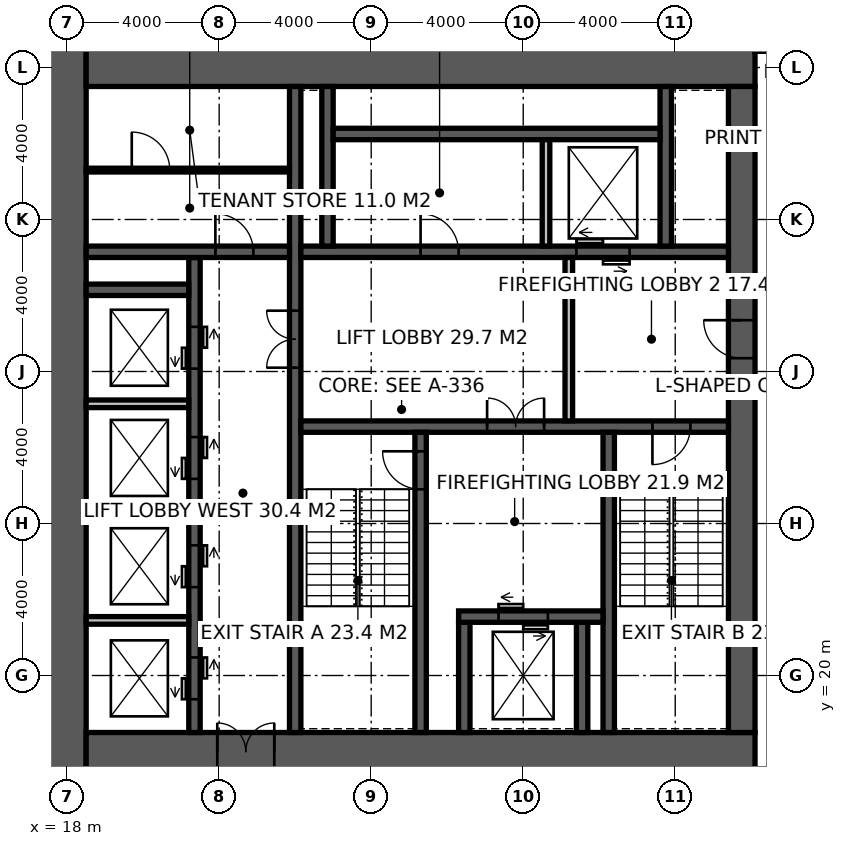
"""IFC4 building model, lengths in metres.
Left out: names, types, materials, properties, quantities, classifications, styles, units other than length and angle.
Written with IfcOpenShell. Run it as: python <this file> out.ifc"""

import sys

from ifc_helpers import new_model, si_unit, direction, frame, frame_2d, origin, place, context, subcontext, project, spatial, rectangle, extrude, element, fill, save


model = new_model("IFC4")
c1 = context("Model", 3, precision=1e-05, world=origin(), true_north=direction((0.0, 1.0)))
c2 = subcontext(c1, "Body", "Model", "MODEL_VIEW")
j1 = project(units=[si_unit("LENGTHUNIT", "METRE"), si_unit("PLANEANGLEUNIT", "RADIAN")], contexts=[c1])
p1 = place(None, origin())
s1 = spatial("IfcSite", under=j1, at=p1, CompositionType="ELEMENT")
p2 = place(p1, origin())
s2 = spatial("IfcBuilding", under=s1, at=p2, CompositionType="ELEMENT")
p3 = place(p2, frame((0.0, 0.0, 214.2)))
s3 = spatial("IfcBuildingStorey", under=s2, at=p3, CompositionType="ELEMENT", Elevation=214.2)
p4 = place(p3, frame((18.0, 17.5, -0.15), z_axis=(0.0, 0.0, 1.0), x_axis=(0.0, 1.0, 0.0)))
e1 = element("IfcWall", 1, at=p4, inside=s3, PredefinedType="SHEAR", context=c2, shape_type="SweptSolid", body=[
    extrude(rectangle(XDim=19.0, YDim=1.0, at=frame_2d((9.5, 0.0))), origin(), (0.0, 0.0, 1.0), 4.0),
])
p5 = place(p3, frame((18.5, 18.0, -0.15), z_axis=(0.0, 0.0, 1.0), x_axis=(1.0, 0.0, 0.0)))
e2 = element("IfcWall", 2, at=p5, inside=s3, PredefinedType="SHEAR", context=c2, shape_type="SweptSolid", body=[
    extrude(rectangle(XDim=17.6, YDim=1.0, at=frame_2d((8.8, 0.0))), origin(), (0.0, 0.0, 1.0), 4.0),
])
p6 = place(p5, frame((3.45, 0.0, 0.15)))
e3 = element("IfcOpeningElement", 3, at=p6, cuts=e2, PredefinedType="OPENING", context=c2, shape_type="SweptSolid", body=[
    extrude(rectangle(XDim=1.5, YDim=2.4, at=frame_2d((0.75, 1.2))), frame((0.0, 0.51, 0.0), z_axis=(0.0, -1.0, 0.0), x_axis=(1.0, 0.0, 0.0)), (0.0, 0.0, 1.0), 1.02),
])
p7 = place(p3, frame((18.5, 36.0, -0.15), z_axis=(0.0, 0.0, 1.0), x_axis=(1.0, 0.0, 0.0)))
e4 = element("IfcWall", 4, at=p7, inside=s3, PredefinedType="SHEAR", context=c2, shape_type="SweptSolid", body=[
    extrude(rectangle(XDim=17.6, YDim=1.0, at=frame_2d((8.8, 0.0))), origin(), (0.0, 0.0, 1.0), 4.0),
])
p8 = place(p3, frame((35.75, 18.5, -0.15), z_axis=(0.0, 0.0, 1.0), x_axis=(0.0, 1.0, 0.0)))
e5 = element("IfcWall", 5, at=p8, inside=s3, PredefinedType="SHEAR", context=c2, shape_type="SweptSolid", body=[
    extrude(rectangle(XDim=17.0, YDim=0.7, at=frame_2d((8.5, 0.0))), origin(), (0.0, 0.0, 1.0), 4.0),
])
p9 = place(p8, frame((9.85, 0.0, 0.15)))
e6 = element("IfcOpeningElement", 6, at=p9, cuts=e5, PredefinedType="OPENING", context=c2, shape_type="SweptSolid", body=[
    extrude(rectangle(XDim=1.0, YDim=2.2, at=frame_2d((0.5, 1.1))), frame((0.0, 0.36, 0.0), z_axis=(0.0, -1.0, 0.0), x_axis=(1.0, 0.0, 0.0)), (0.0, 0.0, 1.0), 0.72),
])
p10 = place(p3, frame((24.0, 18.5, -0.15), z_axis=(0.0, 0.0, 1.0), x_axis=(0.0, 1.0, 0.0)))
e7 = element("IfcWall", 7, at=p10, inside=s3, PredefinedType="SHEAR", context=c2, shape_type="SweptSolid", body=[
    extrude(rectangle(XDim=17.0, YDim=0.3, at=frame_2d((8.5, 0.0))), origin(), (0.0, 0.0, 1.0), 4.0),
])
p11 = place(p10, frame((9.6, 0.0, 0.15)))
e8 = element("IfcOpeningElement", 8, at=p11, cuts=e7, PredefinedType="OPENING", context=c2, shape_type="SweptSolid", body=[
    extrude(rectangle(XDim=1.5, YDim=2.4, at=frame_2d((0.75, 1.2))), frame((0.0, 0.16, 0.0), z_axis=(0.0, -1.0, 0.0), x_axis=(1.0, 0.0, 0.0)), (0.0, 0.0, 1.0), 0.32),
])
p12 = place(p3, frame((24.15, 26.55, -0.15), z_axis=(0.0, 0.0, 1.0), x_axis=(1.0, 0.0, 0.0)))
e9 = element("IfcWall", 9, at=p12, inside=s3, PredefinedType="SHEAR", context=c2, shape_type="SweptSolid", body=[
    extrude(rectangle(XDim=11.25, YDim=0.3, at=frame_2d((5.625, 0.0))), origin(), (0.0, 0.0, 1.0), 4.0),
])
p13 = place(p12, frame((9.25, 0.0, 0.15)))
e10 = element("IfcOpeningElement", 10, at=p13, cuts=e9, PredefinedType="OPENING", context=c2, shape_type="SweptSolid", body=[
    extrude(rectangle(XDim=1.0, YDim=2.2, at=frame_2d((0.5, 1.1))), frame((0.0, 0.16, 0.0), z_axis=(0.0, -1.0, 0.0), x_axis=(1.0, 0.0, 0.0)), (0.0, 0.0, 1.0), 0.32),
])
p14 = place(p12, frame((4.9, 0.0, 0.15)))
e11 = element("IfcOpeningElement", 11, at=p14, cuts=e9, PredefinedType="OPENING", context=c2, shape_type="SweptSolid", body=[
    extrude(rectangle(XDim=1.5, YDim=2.4, at=frame_2d((0.75, 1.2))), frame((0.0, 0.16, 0.0), z_axis=(0.0, -1.0, 0.0), x_axis=(1.0, 0.0, 0.0)), (0.0, 0.0, 1.0), 0.32),
])
p15 = place(p3, frame((27.3, 18.5, -0.15), z_axis=(0.0, 0.0, 1.0), x_axis=(0.0, 1.0, 0.0)))
e12 = element("IfcWall", 12, at=p15, inside=s3, PredefinedType="SHEAR", context=c2, shape_type="SweptSolid", body=[
    extrude(rectangle(XDim=7.9, YDim=0.3, at=frame_2d((3.95, 0.0))), origin(), (0.0, 0.0, 1.0), 4.0),
])
p16 = place(p15, frame((6.4, 0.0, 0.15)))
e13 = element("IfcOpeningElement", 13, at=p16, cuts=e12, PredefinedType="OPENING", context=c2, shape_type="SweptSolid", body=[
    extrude(rectangle(XDim=1.0, YDim=2.2, at=frame_2d((0.5, 1.1))), frame((0.0, 0.16, 0.0), z_axis=(0.0, -1.0, 0.0), x_axis=(1.0, 0.0, 0.0)), (0.0, 0.0, 1.0), 0.32),
])
p17 = place(p3, frame((32.25, 18.5, -0.15), z_axis=(0.0, 0.0, 1.0), x_axis=(0.0, 1.0, 0.0)))
e14 = element("IfcWall", 14, at=p17, inside=s3, PredefinedType="SHEAR", context=c2, shape_type="SweptSolid", body=[
    extrude(rectangle(XDim=7.9, YDim=0.3, at=frame_2d((3.95, 0.0))), origin(), (0.0, 0.0, 1.0), 4.0),
])
for number, where, z_axis, x_axis in (
    (15, (28.45, 18.5, -0.15), (0.0, 0.0, 1.0), (0.0, 1.0, 0.0)),
    (16, (31.55, 18.5, -0.15), (0.0, 0.0, 1.0), (0.0, 1.0, 0.0)),
):
    element("IfcWall", number, at=place(p3, frame(where, z_axis=z_axis, x_axis=x_axis)), inside=s3, PredefinedType="SHEAR", context=c2, shape_type="SweptSolid", body=[
        extrude(rectangle(XDim=2.9, YDim=0.3, at=frame_2d((1.45, 0.0))), origin(), (0.0, 0.0, 1.0), 4.0),
    ])
p18 = place(p3, frame((28.3, 21.55, -0.15), z_axis=(0.0, 0.0, 1.0), x_axis=(1.0, 0.0, 0.0)))
e17 = element("IfcWall", 17, at=p18, inside=s3, PredefinedType="SHEAR", context=c2, shape_type="SweptSolid", body=[
    extrude(rectangle(XDim=3.8, YDim=0.3, at=frame_2d((1.9, 0.0))), origin(), (0.0, 0.0, 1.0), 4.0),
])
p19 = place(p18, frame((1.05, 0.0, 0.15)))
e18 = element("IfcOpeningElement", 18, at=p19, cuts=e17, PredefinedType="OPENING", context=c2, shape_type="SweptSolid", body=[
    extrude(rectangle(XDim=1.3, YDim=2.4, at=frame_2d((0.65, 1.2))), frame((0.0, 0.16, 0.0), z_axis=(0.0, -1.0, 0.0), x_axis=(1.0, 0.0, 0.0)), (0.0, 0.0, 1.0), 0.32),
])
p20 = place(p3, frame((24.15, 31.15, -0.15), z_axis=(0.0, 0.0, 1.0), x_axis=(1.0, 0.0, 0.0)))
e19 = element("IfcWall", 19, at=p20, inside=s3, PredefinedType="SHEAR", context=c2, shape_type="SweptSolid", body=[
    extrude(rectangle(XDim=11.25, YDim=0.3, at=frame_2d((5.625, 0.0))), origin(), (0.0, 0.0, 1.0), 4.0),
])
p21 = place(p20, frame((3.15, 0.0, 0.15)))
e20 = element("IfcOpeningElement", 20, at=p21, cuts=e19, PredefinedType="OPENING", context=c2, shape_type="SweptSolid", body=[
    extrude(rectangle(XDim=1.0, YDim=2.2, at=frame_2d((0.5, 1.1))), frame((0.0, 0.16, 0.0), z_axis=(0.0, -1.0, 0.0), x_axis=(1.0, 0.0, 0.0)), (0.0, 0.0, 1.0), 0.32),
])
p22 = place(p20, frame((7.25, 0.0, 0.15)))
e21 = element("IfcOpeningElement", 21, at=p22, cuts=e19, PredefinedType="OPENING", context=c2, shape_type="SweptSolid", body=[
    extrude(rectangle(XDim=1.4, YDim=2.4, at=frame_2d((0.7, 1.2))), frame((0.0, 0.16, 0.0), z_axis=(0.0, -1.0, 0.0), x_axis=(1.0, 0.0, 0.0)), (0.0, 0.0, 1.0), 0.32),
])
p23 = place(p3, frame((21.35, 18.5, -0.15), z_axis=(0.0, 0.0, 1.0), x_axis=(0.0, 1.0, 0.0)))
e22 = element("IfcWall", 22, at=p23, inside=s3, PredefinedType="SHEAR", context=c2, shape_type="SweptSolid", body=[
    extrude(rectangle(XDim=12.5, YDim=0.3, at=frame_2d((6.25, 0.0))), origin(), (0.0, 0.0, 1.0), 4.0),
])
p24 = place(p23, frame((0.875, 0.0, 0.15)))
e23 = element("IfcOpeningElement", 23, at=p24, cuts=e22, PredefinedType="OPENING", context=c2, shape_type="SweptSolid", body=[
    extrude(rectangle(XDim=1.1, YDim=2.2, at=frame_2d((0.55, 1.1))), frame((0.0, 0.16, 0.0), z_axis=(0.0, -1.0, 0.0), x_axis=(1.0, 0.0, 0.0)), (0.0, 0.0, 1.0), 0.32),
])
p25 = place(p23, frame((3.825, 0.0, 0.15)))
e24 = element("IfcOpeningElement", 24, at=p25, cuts=e22, PredefinedType="OPENING", context=c2, shape_type="SweptSolid", body=[
    extrude(rectangle(XDim=1.1, YDim=2.2, at=frame_2d((0.55, 1.1))), frame((0.0, 0.16, 0.0), z_axis=(0.0, -1.0, 0.0), x_axis=(1.0, 0.0, 0.0)), (0.0, 0.0, 1.0), 0.32),
])
p26 = place(p23, frame((6.675, 0.0, 0.15)))
e25 = element("IfcOpeningElement", 25, at=p26, cuts=e22, PredefinedType="OPENING", context=c2, shape_type="SweptSolid", body=[
    extrude(rectangle(XDim=1.1, YDim=2.2, at=frame_2d((0.55, 1.1))), frame((0.0, 0.16, 0.0), z_axis=(0.0, -1.0, 0.0), x_axis=(1.0, 0.0, 0.0)), (0.0, 0.0, 1.0), 0.32),
])
p27 = place(p23, frame((9.575, 0.0, 0.15)))
e26 = element("IfcOpeningElement", 26, at=p27, cuts=e22, PredefinedType="OPENING", context=c2, shape_type="SweptSolid", body=[
    extrude(rectangle(XDim=1.1, YDim=2.2, at=frame_2d((0.55, 1.1))), frame((0.0, 0.16, 0.0), z_axis=(0.0, -1.0, 0.0), x_axis=(1.0, 0.0, 0.0)), (0.0, 0.0, 1.0), 0.32),
])
p28 = place(p3, frame((18.5, 31.15, -0.15), z_axis=(0.0, 0.0, 1.0), x_axis=(1.0, 0.0, 0.0)))
e27 = element("IfcWall", 27, at=p28, inside=s3, PredefinedType="SHEAR", context=c2, shape_type="SweptSolid", body=[
    extrude(rectangle(XDim=5.35, YDim=0.3, at=frame_2d((2.675, 0.0))), origin(), (0.0, 0.0, 1.0), 4.0),
])
p29 = place(p28, frame((3.4, 0.0, 0.15)))
e28 = element("IfcOpeningElement", 28, at=p29, cuts=e27, PredefinedType="OPENING", context=c2, shape_type="SweptSolid", body=[
    extrude(rectangle(XDim=1.0, YDim=2.2, at=frame_2d((0.5, 1.1))), frame((0.0, 0.16, 0.0), z_axis=(0.0, -1.0, 0.0), x_axis=(1.0, 0.0, 0.0)), (0.0, 0.0, 1.0), 0.32),
])
p30 = place(p3, frame((18.5, 30.15, -0.15), z_axis=(0.0, 0.0, 1.0), x_axis=(1.0, 0.0, 0.0)))
e29 = element("IfcWall", 29, at=p30, inside=s3, PredefinedType="SHEAR", context=c2, shape_type="SweptSolid", body=[
    extrude(rectangle(XDim=2.7, YDim=0.3, at=frame_2d((1.35, 0.0))), origin(), (0.0, 0.0, 1.0), 4.0),
])
for number, where, z_axis, x_axis in (
    (30, (24.85, 31.3, -0.15), (0.0, 0.0, 1.0), (0.0, 1.0, 0.0)),
    (31, (33.75, 31.3, -0.15), (0.0, 0.0, 1.0), (0.0, 1.0, 0.0)),
):
    element("IfcWall", number, at=place(p3, frame(where, z_axis=z_axis, x_axis=x_axis)), inside=s3, PredefinedType="SHEAR", context=c2, shape_type="SweptSolid", body=[
        extrude(rectangle(XDim=4.2, YDim=0.3, at=frame_2d((2.1, 0.0))), origin(), (0.0, 0.0, 1.0), 4.0),
    ])
p31 = place(p3, frame((25.0, 34.25, -0.15), z_axis=(0.0, 0.0, 1.0), x_axis=(1.0, 0.0, 0.0)))
e32 = element("IfcWall", 32, at=p31, inside=s3, PredefinedType="SHEAR", context=c2, shape_type="SweptSolid", body=[
    extrude(rectangle(XDim=8.6, YDim=0.3, at=frame_2d((4.3, 0.0))), origin(), (0.0, 0.0, 1.0), 4.0),
])
p32 = place(p3, frame((30.6, 31.3, -0.15), z_axis=(0.0, 0.0, 1.0), x_axis=(0.0, 1.0, 0.0)))
e33 = element("IfcWall", 33, at=p32, inside=s3, PredefinedType="SOLIDWALL", context=c2, shape_type="SweptSolid", body=[
    extrude(rectangle(XDim=2.8, YDim=0.2, at=frame_2d((1.4, 0.0))), origin(), (0.0, 0.0, 1.0), 4.0),
])
for number, where, z_axis, x_axis in (
    (34, (18.5, 21.45, -0.15), (0.0, 0.0, 1.0), (1.0, 0.0, 0.0)),
    (35, (18.5, 24.3, -0.15), (0.0, 0.0, 1.0), (1.0, 0.0, 0.0)),
    (36, (18.5, 27.15, -0.15), (0.0, 0.0, 1.0), (1.0, 0.0, 0.0)),
):
    element("IfcWall", number, at=place(p3, frame(where, z_axis=z_axis, x_axis=x_axis)), inside=s3, PredefinedType="SOLIDWALL", context=c2, shape_type="SweptSolid", body=[
        extrude(rectangle(XDim=2.7, YDim=0.2, at=frame_2d((1.35, 0.0))), origin(), (0.0, 0.0, 1.0), 4.0),
    ])
p33 = place(p3, frame((31.2, 26.7, 0.0), z_axis=(0.0, 0.0, 1.0), x_axis=(0.0, 1.0, 0.0)))
e37 = element("IfcWall", 37, at=p33, inside=s3, PredefinedType="SOLIDWALL", context=c2, shape_type="SweptSolid", body=[
    extrude(rectangle(XDim=4.3, YDim=0.2, at=frame_2d((2.15, 0.0))), origin(), (0.0, 0.0, 1.0), 3.85),
])
p34 = place(p3, frame((18.5, 33.3, 0.0), z_axis=(0.0, 0.0, 1.0), x_axis=(1.0, 0.0, 0.0)))
e38 = element("IfcWall", 38, at=p34, inside=s3, PredefinedType="PARTITIONING", context=c2, shape_type="SweptSolid", body=[
    extrude(rectangle(XDim=5.35, YDim=0.1, at=frame_2d((2.675, 0.0))), origin(), (0.0, 0.0, 1.0), 3.85),
])
p35 = place(p34, frame((1.2, 0.0, 0.0)))
e39 = element("IfcOpeningElement", 39, at=p35, cuts=e38, PredefinedType="OPENING", context=c2, shape_type="SweptSolid", body=[
    extrude(rectangle(XDim=1.0, YDim=2.2, at=frame_2d((0.5, 1.1))), frame((0.0, 0.06, 0.0), z_axis=(0.0, -1.0, 0.0), x_axis=(1.0, 0.0, 0.0)), (0.0, 0.0, 1.0), 0.12),
])
p36 = place(p16, origin())
e40 = element("IfcDoor", 40, at=p36, inside=s3, OperationType="SINGLE_SWING_RIGHT", PredefinedType="DOOR", context=c2, shape_type="SweptSolid", body=[
    extrude(rectangle(XDim=1.0, YDim=2.2, at=frame_2d((0.5, 1.1))), frame((0.0, 0.025, 0.0), z_axis=(0.0, -1.0, 0.0), x_axis=(1.0, 0.0, 0.0)), (0.0, 0.0, 1.0), 0.05),
])
fill(e13, e40)
p37 = place(p13, frame((1.0, 0.0, 0.0), z_axis=(0.0, 0.0, 1.0), x_axis=(-1.0, 0.0, 0.0)))
e41 = element("IfcDoor", 41, at=p37, inside=s3, OperationType="SINGLE_SWING_RIGHT", PredefinedType="DOOR", context=c2, shape_type="SweptSolid", body=[
    extrude(rectangle(XDim=1.0, YDim=2.2, at=frame_2d((0.5, 1.1))), frame((0.0, 0.025, 0.0), z_axis=(0.0, -1.0, 0.0), x_axis=(1.0, 0.0, 0.0)), (0.0, 0.0, 1.0), 0.05),
])
fill(e10, e41)
p38 = place(p9, origin())
e42 = element("IfcDoor", 42, at=p38, inside=s3, OperationType="SINGLE_SWING_RIGHT", PredefinedType="DOOR", context=c2, shape_type="SweptSolid", body=[
    extrude(rectangle(XDim=1.0, YDim=2.2, at=frame_2d((0.5, 1.1))), frame((0.0, 0.025, 0.0), z_axis=(0.0, -1.0, 0.0), x_axis=(1.0, 0.0, 0.0)), (0.0, 0.0, 1.0), 0.05),
])
fill(e6, e42)
p39 = place(p14, origin())
e43 = element("IfcDoor", 43, at=p39, inside=s3, OperationType="DOUBLE_DOOR_DOUBLE_SWING", PredefinedType="DOOR", context=c2, shape_type="SweptSolid", body=[
    extrude(rectangle(XDim=1.5, YDim=2.4, at=frame_2d((0.75, 1.2))), frame((0.0, 0.025, 0.0), z_axis=(0.0, -1.0, 0.0), x_axis=(1.0, 0.0, 0.0)), (0.0, 0.0, 1.0), 0.05),
])
fill(e11, e43)
p40 = place(p11, origin())
e44 = element("IfcDoor", 44, at=p40, inside=s3, OperationType="DOUBLE_DOOR_DOUBLE_SWING", PredefinedType="DOOR", context=c2, shape_type="SweptSolid", body=[
    extrude(rectangle(XDim=1.5, YDim=2.4, at=frame_2d((0.75, 1.2))), frame((0.0, 0.025, 0.0), z_axis=(0.0, -1.0, 0.0), x_axis=(1.0, 0.0, 0.0)), (0.0, 0.0, 1.0), 0.05),
])
fill(e8, e44)
p41 = place(p29, origin())
e45 = element("IfcDoor", 45, at=p41, inside=s3, OperationType="SINGLE_SWING_LEFT", PredefinedType="DOOR", context=c2, shape_type="SweptSolid", body=[
    extrude(rectangle(XDim=1.0, YDim=2.2, at=frame_2d((0.5, 1.1))), frame((0.0, 0.025, 0.0), z_axis=(0.0, -1.0, 0.0), x_axis=(1.0, 0.0, 0.0)), (0.0, 0.0, 1.0), 0.05),
])
fill(e28, e45)
p42 = place(p35, origin())
e46 = element("IfcDoor", 46, at=p42, inside=s3, OperationType="SINGLE_SWING_LEFT", PredefinedType="DOOR", context=c2, shape_type="SweptSolid", body=[
    extrude(rectangle(XDim=1.0, YDim=2.2, at=frame_2d((0.5, 1.1))), frame((0.0, 0.025, 0.0), z_axis=(0.0, -1.0, 0.0), x_axis=(1.0, 0.0, 0.0)), (0.0, 0.0, 1.0), 0.05),
])
fill(e39, e46)
p43 = place(p21, origin())
e47 = element("IfcDoor", 47, at=p43, inside=s3, OperationType="SINGLE_SWING_LEFT", PredefinedType="DOOR", context=c2, shape_type="SweptSolid", body=[
    extrude(rectangle(XDim=1.0, YDim=2.2, at=frame_2d((0.5, 1.1))), frame((0.0, 0.025, 0.0), z_axis=(0.0, -1.0, 0.0), x_axis=(1.0, 0.0, 0.0)), (0.0, 0.0, 1.0), 0.05),
])
fill(e20, e47)
p44 = place(p6, origin())
e48 = element("IfcDoor", 48, at=p44, inside=s3, OperationType="DOUBLE_DOOR_DOUBLE_SWING", PredefinedType="DOOR", context=c2, shape_type="SweptSolid", body=[
    extrude(rectangle(XDim=1.5, YDim=2.4, at=frame_2d((0.75, 1.2))), frame((0.0, 0.025, 0.0), z_axis=(0.0, -1.0, 0.0), x_axis=(1.0, 0.0, 0.0)), (0.0, 0.0, 1.0), 0.05),
])
fill(e3, e48)
p45 = place(p19, origin())
e49 = element("IfcDoor", 49, at=p45, inside=s3, OperationType="DOUBLE_DOOR_SLIDING", PredefinedType="DOOR", context=c2, shape_type="SweptSolid", body=[
    extrude(rectangle(XDim=1.3, YDim=2.4, at=frame_2d((0.65, 1.2))), frame((0.0, 0.025, 0.0), z_axis=(0.0, -1.0, 0.0), x_axis=(1.0, 0.0, 0.0)), (0.0, 0.0, 1.0), 0.05),
])
fill(e18, e49)
p46 = place(p22, origin())
e50 = element("IfcDoor", 50, at=p46, inside=s3, OperationType="DOUBLE_DOOR_SLIDING", PredefinedType="DOOR", context=c2, shape_type="SweptSolid", body=[
    extrude(rectangle(XDim=1.4, YDim=2.4, at=frame_2d((0.7, 1.2))), frame((0.0, 0.025, 0.0), z_axis=(0.0, -1.0, 0.0), x_axis=(1.0, 0.0, 0.0)), (0.0, 0.0, 1.0), 0.05),
])
fill(e21, e50)
p47 = place(p24, origin())
e51 = element("IfcDoor", 51, at=p47, inside=s3, OperationType="DOUBLE_DOOR_SLIDING", PredefinedType="DOOR", context=c2, shape_type="SweptSolid", body=[
    extrude(rectangle(XDim=1.1, YDim=2.2, at=frame_2d((0.55, 1.1))), frame((0.0, 0.025, 0.0), z_axis=(0.0, -1.0, 0.0), x_axis=(1.0, 0.0, 0.0)), (0.0, 0.0, 1.0), 0.05),
])
fill(e23, e51)
p48 = place(p25, origin())
e52 = element("IfcDoor", 52, at=p48, inside=s3, OperationType="DOUBLE_DOOR_SLIDING", PredefinedType="DOOR", context=c2, shape_type="SweptSolid", body=[
    extrude(rectangle(XDim=1.1, YDim=2.2, at=frame_2d((0.55, 1.1))), frame((0.0, 0.025, 0.0), z_axis=(0.0, -1.0, 0.0), x_axis=(1.0, 0.0, 0.0)), (0.0, 0.0, 1.0), 0.05),
])
fill(e24, e52)
p49 = place(p26, origin())
e53 = element("IfcDoor", 53, at=p49, inside=s3, OperationType="DOUBLE_DOOR_SLIDING", PredefinedType="DOOR", context=c2, shape_type="SweptSolid", body=[
    extrude(rectangle(XDim=1.1, YDim=2.2, at=frame_2d((0.55, 1.1))), frame((0.0, 0.025, 0.0), z_axis=(0.0, -1.0, 0.0), x_axis=(1.0, 0.0, 0.0)), (0.0, 0.0, 1.0), 0.05),
])
fill(e25, e53)
p50 = place(p27, origin())
e54 = element("IfcDoor", 54, at=p50, inside=s3, OperationType="DOUBLE_DOOR_SLIDING", PredefinedType="DOOR", context=c2, shape_type="SweptSolid", body=[
    extrude(rectangle(XDim=1.1, YDim=2.2, at=frame_2d((0.55, 1.1))), frame((0.0, 0.025, 0.0), z_axis=(0.0, -1.0, 0.0), x_axis=(1.0, 0.0, 0.0)), (0.0, 0.0, 1.0), 0.05),
])
fill(e26, e54)
save(model, sys.argv[1])
